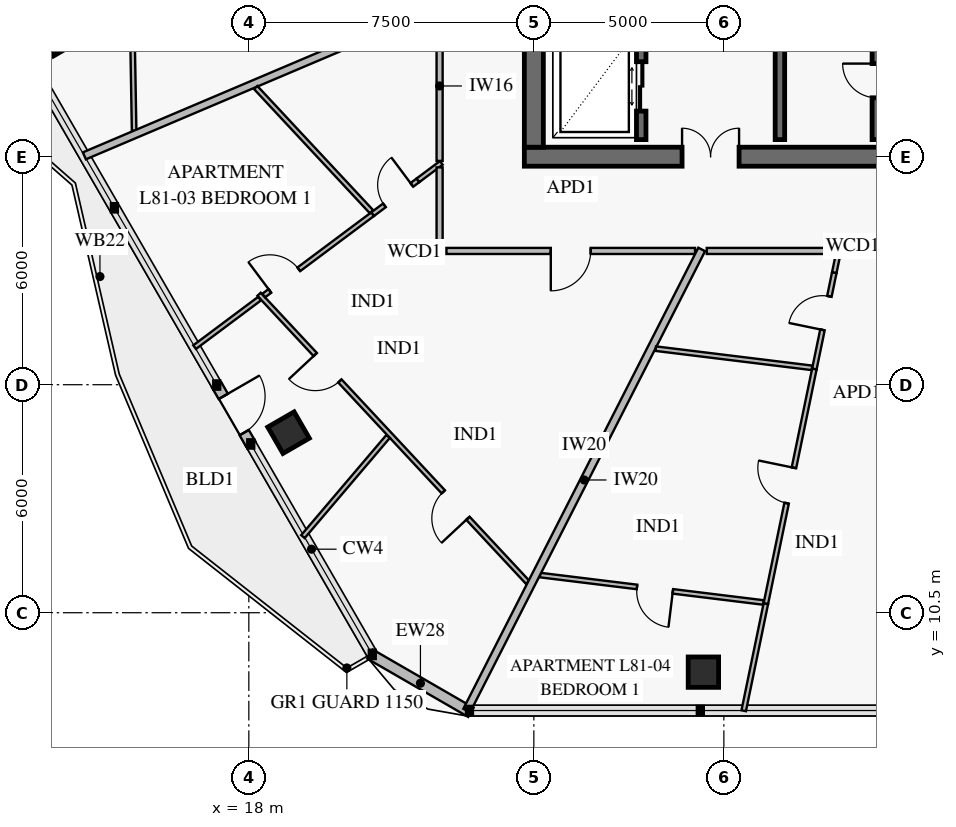
"""IFC4 building model, lengths in metres.
Left out: names, types, materials, properties, quantities, classifications, styles, units other than length and angle.
Written with IfcOpenShell. Run it as: python <this file> out.ifc"""

import sys

from ifc_helpers import new_model, si_unit, direction, frame, frame_2d, origin, origin_2d, place, context, subcontext, project, spatial, rectangle, extrude, element, fill, save


model = new_model("IFC4")
c1 = context("Model", 3, precision=1e-05, world=origin(), true_north=direction((0.0, 1.0)))
c2 = subcontext(c1, "Body", "Model", "MODEL_VIEW")
j1 = project(units=[si_unit("LENGTHUNIT", "METRE"), si_unit("PLANEANGLEUNIT", "RADIAN")], contexts=[c1])
p1 = place(None, origin())
s1 = spatial("IfcSite", under=j1, at=p1, CompositionType="ELEMENT")
p2 = place(p1, origin())
s2 = spatial("IfcBuilding", under=s1, at=p2, CompositionType="ELEMENT")
p3 = place(p2, frame((0.0, 0.0, 319.6)))
s3 = spatial("IfcBuildingStorey", under=s2, at=p3, CompositionType="ELEMENT", Elevation=319.6)
p4 = place(p3, frame((25.25, 22.5, 0.0), z_axis=(0.0, 0.0, 1.0), x_axis=(1.0, 0.0, 0.0)))
e1 = element("IfcWall", 1, at=p4, inside=s3, PredefinedType="SHEAR", context=c2, shape_type="SweptSolid", body=[
    extrude(rectangle(XDim=9.8, YDim=0.5, at=frame_2d((4.9, 0.0))), origin(), (0.0, 0.0, 1.0), 3.8),
])
p5 = place(p4, frame((4.15, 0.0, 0.0)))
e2 = element("IfcOpeningElement", 2, at=p5, cuts=e1, PredefinedType="OPENING", context=c2, shape_type="SweptSolid", body=[
    extrude(rectangle(XDim=1.5, YDim=2.15, at=frame_2d((0.75, 1.075))), frame((0.0, 0.262, 0.0), z_axis=(0.0, -1.0, 0.0), x_axis=(1.0, 0.0, 0.0)), (0.0, 0.0, 1.0), 0.524),
])
p6 = place(p3, frame((25.5, 22.75, 0.0), z_axis=(0.0, 0.0, 1.0), x_axis=(0.0, 1.0, 0.0)))
e3 = element("IfcWall", 3, at=p6, inside=s3, PredefinedType="SHEAR", context=c2, shape_type="SweptSolid", body=[
    extrude(rectangle(XDim=18.5, YDim=0.5, at=frame_2d((9.25, 0.0))), origin(), (0.0, 0.0, 1.0), 3.8),
])
p7 = place(p6, frame((9.0, 0.0, 0.0)))
e4 = element("IfcOpeningElement", 4, at=p7, cuts=e3, PredefinedType="OPENING", context=c2, shape_type="SweptSolid", body=[
    extrude(rectangle(XDim=1.1, YDim=2.15, at=frame_2d((0.55, 1.075))), frame((0.0, 0.262, 0.0), z_axis=(0.0, -1.0, 0.0), x_axis=(1.0, 0.0, 0.0)), (0.0, 0.0, 1.0), 0.524),
])
for number, where, z_axis, x_axis in (
    (5, (13.007, 25.698, 0.0), (0.0, 0.0, 1.0), (0.5, -0.866, 0.0)),
    (6, (19.045, 15.238, 0.0), (0.0, 0.0, 1.0), (0.5, -0.866, 0.0)),
    (7, (29.961, 8.936, 0.0), (0.0, 0.0, 1.0), (1.0, 0.0, 0.0)),
):
    element("IfcColumn", number, at=place(p3, frame(where, z_axis=z_axis, x_axis=x_axis)), inside=s3, PredefinedType="COLUMN", context=c2, shape_type="SweptSolid", body=[
        extrude(rectangle(XDim=0.8, YDim=0.8, at=origin_2d()), origin(), (0.0, 0.0, 1.0), 3.55),
    ])
p8 = place(p3, frame((23.843, 7.878, 0.0), z_axis=(0.0, 0.0, 1.0), x_axis=(-0.866023752521, 0.50000286006, 0.0)))
e8 = element("IfcWall", 8, at=p8, inside=s3, PredefinedType="SOLIDWALL", context=c2, shape_type="SweptSolid", body=[
    extrude(rectangle(XDim=3.065, YDim=0.28, at=frame_2d((1.532, 0.0))), origin(), (0.0, 0.0, 1.0), 3.55),
])
p9 = place(p3, frame((18.051, 14.941, 0.0), z_axis=(0.0, 0.0, 1.0), x_axis=(-0.500041240653, 0.866001592173, 0.0)))
e9 = element("IfcWall", 9, at=p9, inside=s3, PredefinedType="SOLIDWALL", context=c2, shape_type="SweptSolid", body=[
    extrude(rectangle(XDim=1.79, YDim=0.28, at=frame_2d((0.895, 0.0))), origin(), (0.0, 0.0, 1.0), 3.55),
])
p10 = place(p9, frame((0.345, 0.0, 0.0)))
e10 = element("IfcOpeningElement", 10, at=p10, cuts=e9, PredefinedType="OPENING", context=c2, shape_type="SweptSolid", body=[
    extrude(rectangle(XDim=1.1, YDim=2.2, at=frame_2d((0.55, 1.1))), frame((0.0, 0.152, 0.0), z_axis=(0.0, -1.0, 0.0), x_axis=(1.0, 0.0, 0.0)), (0.0, 0.0, 1.0), 0.304),
])
p11 = place(p3, frame((28.325, 22.95, 0.0), z_axis=(0.0, 0.0, 1.0), x_axis=(0.0, 1.0, 0.0)))
e11 = element("IfcWall", 11, at=p11, inside=s3, PredefinedType="SOLIDWALL", context=c2, shape_type="SweptSolid", body=[
    extrude(rectangle(XDim=8.2, YDim=0.25, at=frame_2d((4.1, 0.0))), origin(), (0.0, 0.0, 1.0), 3.8),
])
p12 = place(p11, frame((0.75, 0.0, 0.0)))
e12 = element("IfcOpeningElement", 12, at=p12, cuts=e11, PredefinedType="OPENING", context=c2, shape_type="SweptSolid", body=[
    extrude(rectangle(XDim=1.3, YDim=2.3, at=frame_2d((0.65, 1.15))), frame((0.0, 0.137, 0.0), z_axis=(0.0, -1.0, 0.0), x_axis=(1.0, 0.0, 0.0)), (0.0, 0.0, 1.0), 0.274),
])
p13 = place(p11, frame((3.78, 0.0, 0.0)))
e13 = element("IfcOpeningElement", 13, at=p13, cuts=e11, PredefinedType="OPENING", context=c2, shape_type="SweptSolid", body=[
    extrude(rectangle(XDim=0.9, YDim=2.1, at=frame_2d((0.45, 1.05))), frame((0.0, 0.137, 0.0), z_axis=(0.0, -1.0, 0.0), x_axis=(1.0, 0.0, 0.0)), (0.0, 0.0, 1.0), 0.274),
])
p14 = place(p11, frame((6.5, 0.0, 0.0)))
e14 = element("IfcOpeningElement", 14, at=p14, cuts=e11, PredefinedType="OPENING", context=c2, shape_type="SweptSolid", body=[
    extrude(rectangle(XDim=0.9, YDim=2.1, at=frame_2d((0.45, 1.05))), frame((0.0, 0.137, 0.0), z_axis=(0.0, -1.0, 0.0), x_axis=(1.0, 0.0, 0.0)), (0.0, 0.0, 1.0), 0.274),
])
p15 = place(p3, frame((31.975, 22.95, 0.0), z_axis=(0.0, 0.0, 1.0), x_axis=(0.0, 1.0, 0.0)))
e15 = element("IfcWall", 15, at=p15, inside=s3, PredefinedType="SOLIDWALL", context=c2, shape_type="SweptSolid", body=[
    extrude(rectangle(XDim=8.2, YDim=0.25, at=frame_2d((4.1, 0.0))), origin(), (0.0, 0.0, 1.0), 3.8),
])
p16 = place(p3, frame((34.525, 22.95, 0.0), z_axis=(0.0, 0.0, 1.0), x_axis=(0.0, 1.0, 0.0)))
e16 = element("IfcWall", 16, at=p16, inside=s3, PredefinedType="SOLIDWALL", context=c2, shape_type="SweptSolid", body=[
    extrude(rectangle(XDim=8.2, YDim=0.25, at=frame_2d((4.1, 0.0))), origin(), (0.0, 0.0, 1.0), 3.8),
])
p17 = place(p16, frame((1.1, 0.0, 0.0)))
e17 = element("IfcOpeningElement", 17, at=p17, cuts=e16, PredefinedType="OPENING", context=c2, shape_type="SweptSolid", body=[
    extrude(rectangle(XDim=0.9, YDim=2.1, at=frame_2d((0.45, 1.05))), frame((0.0, 0.137, 0.0), z_axis=(0.0, -1.0, 0.0), x_axis=(1.0, 0.0, 0.0)), (0.0, 0.0, 1.0), 0.274),
])
p18 = place(p16, frame((5.2, 0.0, 0.0)))
e18 = element("IfcOpeningElement", 18, at=p18, cuts=e16, PredefinedType="OPENING", context=c2, shape_type="SweptSolid", body=[
    extrude(rectangle(XDim=0.9, YDim=2.1, at=frame_2d((0.45, 1.05))), frame((0.0, 0.137, 0.0), z_axis=(0.0, -1.0, 0.0), x_axis=(1.0, 0.0, 0.0)), (0.0, 0.0, 1.0), 0.274),
])
p19 = place(p3, frame((14.78, 34.77, 0.0), z_axis=(0.0, 0.0, 1.0), x_axis=(0.017447291159, -0.999847784431, 0.0)))
e19 = element("IfcWall", 19, at=p19, inside=s3, PredefinedType="PARTITIONING", context=c2, shape_type="SweptSolid", body=[
    extrude(rectangle(XDim=11.586, YDim=0.12, at=frame_2d((5.793, 0.0))), origin(), (0.0, 0.0, 1.0), 3.0),
])
p20 = place(p19, frame((2.453, 0.0, 0.0)))
e20 = element("IfcOpeningElement", 20, at=p20, cuts=e19, PredefinedType="OPENING", context=c2, shape_type="SweptSolid", body=[
    extrude(rectangle(XDim=0.95, YDim=2.1, at=frame_2d((0.475, 1.05))), frame((0.0, 0.072, 0.0), z_axis=(0.0, -1.0, 0.0), x_axis=(1.0, 0.0, 0.0)), (0.0, 0.0, 1.0), 0.144),
])
p21 = place(p19, frame((8.005, 0.0, 0.0)))
e21 = element("IfcOpeningElement", 21, at=p21, cuts=e19, PredefinedType="OPENING", context=c2, shape_type="SweptSolid", body=[
    extrude(rectangle(XDim=0.95, YDim=2.1, at=frame_2d((0.475, 1.05))), frame((0.0, 0.072, 0.0), z_axis=(0.0, -1.0, 0.0), x_axis=(1.0, 0.0, 0.0)), (0.0, 0.0, 1.0), 0.144),
])
p22 = place(p3, frame((18.269, 18.88, 0.0), z_axis=(0.0, 0.0, 1.0), x_axis=(0.682011831642, -0.731341138936, 0.0)))
e22 = element("IfcWall", 22, at=p22, inside=s3, PredefinedType="PARTITIONING", context=c2, shape_type="SweptSolid", body=[
    extrude(rectangle(XDim=10.364, YDim=0.12, at=frame_2d((5.182, 0.0))), origin(), (0.0, 0.0, 1.0), 2.97),
])
p23 = place(p22, frame((2.168, 0.0, 0.0)))
e23 = element("IfcOpeningElement", 23, at=p23, cuts=e22, PredefinedType="OPENING", context=c2, shape_type="SweptSolid", body=[
    extrude(rectangle(XDim=0.95, YDim=2.1, at=frame_2d((0.475, 1.05))), frame((0.0, 0.072, 0.0), z_axis=(0.0, -1.0, 0.0), x_axis=(1.0, 0.0, 0.0)), (0.0, 0.0, 1.0), 0.144),
])
p24 = place(p22, frame((7.109, 0.0, 0.0)))
e24 = element("IfcOpeningElement", 24, at=p24, cuts=e22, PredefinedType="OPENING", context=c2, shape_type="SweptSolid", body=[
    extrude(rectangle(XDim=0.95, YDim=2.1, at=frame_2d((0.475, 1.05))), frame((0.0, 0.072, 0.0), z_axis=(0.0, -1.0, 0.0), x_axis=(1.0, 0.0, 0.0)), (0.0, 0.0, 1.0), 0.144),
])
p25 = place(p3, frame((22.45, 21.878, 0.0), z_axis=(0.0, 0.0, 1.0), x_axis=(-0.801099101306, -0.598531728388, 0.0)))
e25 = element("IfcWall", 25, at=p25, inside=s3, PredefinedType="PARTITIONING", context=c2, shape_type="SweptSolid", body=[
    extrude(rectangle(XDim=1.491, YDim=0.12, at=frame_2d((0.746, 0.0))), origin(), (0.0, 0.0, 1.0), 3.2),
])
p26 = place(p25, frame((0.2, 0.0, 0.0)))
e26 = element("IfcOpeningElement", 26, at=p26, cuts=e25, PredefinedType="OPENING", context=c2, shape_type="SweptSolid", body=[
    extrude(rectangle(XDim=0.9, YDim=2.1, at=frame_2d((0.45, 1.05))), frame((0.0, 0.072, 0.0), z_axis=(0.0, -1.0, 0.0), x_axis=(1.0, 0.0, 0.0)), (0.0, 0.0, 1.0), 0.144),
])
p27 = place(p3, frame((21.256, 20.986, 0.0), z_axis=(0.0, 0.0, 1.0), x_axis=(-0.801154440429, -0.598457653122, 0.0)))
e27 = element("IfcWall", 27, at=p27, inside=s3, PredefinedType="PARTITIONING", context=c2, shape_type="SweptSolid", body=[
    extrude(rectangle(XDim=3.574, YDim=0.12, at=frame_2d((1.787, 0.0))), origin(), (0.0, 0.0, 1.0), 3.2),
])
p28 = place(p27, frame((2.422, 0.0, 0.0)))
e28 = element("IfcOpeningElement", 28, at=p28, cuts=e27, PredefinedType="OPENING", context=c2, shape_type="SweptSolid", body=[
    extrude(rectangle(XDim=0.95, YDim=2.1, at=frame_2d((0.475, 1.05))), frame((0.0, 0.072, 0.0), z_axis=(0.0, -1.0, 0.0), x_axis=(1.0, 0.0, 0.0)), (0.0, 0.0, 1.0), 0.144),
])
p29 = place(p3, frame((18.283, 18.765, 0.0), z_axis=(0.0, 0.0, 1.0), x_axis=(-0.80116606549, -0.598442090353, 0.0)))
e29 = element("IfcWall", 29, at=p29, inside=s3, PredefinedType="PARTITIONING", context=c2, shape_type="SweptSolid", body=[
    extrude(rectangle(XDim=2.133, YDim=0.12, at=frame_2d((1.066, 0.0))), origin(), (0.0, 0.0, 1.0), 2.97),
])
p30 = place(p3, frame((23.2, 20.02, 0.0), z_axis=(0.0, 0.0, 1.0), x_axis=(1.0, 0.0, 0.0)))
e30 = element("IfcWall", 30, at=p30, inside=s3, PredefinedType="PARTITIONING", context=c2, shape_type="SweptSolid", body=[
    extrude(rectangle(XDim=6.541, YDim=0.16, at=frame_2d((3.271, 0.0))), origin(), (0.0, 0.0, 1.0), 3.0),
])
p31 = place(p30, frame((2.746, 0.0, 0.0)))
e31 = element("IfcOpeningElement", 31, at=p31, cuts=e30, PredefinedType="OPENING", context=c2, shape_type="SweptSolid", body=[
    extrude(rectangle(XDim=1.05, YDim=2.15, at=frame_2d((0.525, 1.075))), frame((0.0, 0.092, 0.0), z_axis=(0.0, -1.0, 0.0), x_axis=(1.0, 0.0, 0.0)), (0.0, 0.0, 1.0), 0.184),
])
p32 = place(p3, frame((33.406, 19.45, 0.0), z_axis=(0.0, 0.0, 1.0), x_axis=(-0.202468586372, -0.979288757993, 0.0)))
e32 = element("IfcWall", 32, at=p32, inside=s3, PredefinedType="PARTITIONING", context=c2, shape_type="SweptSolid", body=[
    extrude(rectangle(XDim=2.593, YDim=0.12, at=frame_2d((1.296, 0.0))), origin(), (0.0, 0.0, 1.0), 3.55),
])
p33 = place(p32, frame((0.639, 0.0, 0.0)))
e33 = element("IfcOpeningElement", 33, at=p33, cuts=e32, PredefinedType="OPENING", context=c2, shape_type="SweptSolid", body=[
    extrude(rectangle(XDim=0.9, YDim=2.1, at=frame_2d((0.45, 1.05))), frame((0.0, 0.072, 0.0), z_axis=(0.0, -1.0, 0.0), x_axis=(1.0, 0.0, 0.0)), (0.0, 0.0, 1.0), 0.144),
])
p34 = place(p3, frame((32.881, 16.911, 0.0), z_axis=(0.0, 0.0, 1.0), x_axis=(-0.202463483785, -0.979289812943, 0.0)))
e34 = element("IfcWall", 34, at=p34, inside=s3, PredefinedType="PARTITIONING", context=c2, shape_type="SweptSolid", body=[
    extrude(rectangle(XDim=6.305, YDim=0.12, at=frame_2d((3.153, 0.0))), origin(), (0.0, 0.0, 1.0), 3.2),
])
p35 = place(p34, frame((2.653, 0.0, 0.0)))
e35 = element("IfcOpeningElement", 35, at=p35, cuts=e34, PredefinedType="OPENING", context=c2, shape_type="SweptSolid", body=[
    extrude(rectangle(XDim=0.95, YDim=2.1, at=frame_2d((0.475, 1.05))), frame((0.0, 0.072, 0.0), z_axis=(0.0, -1.0, 0.0), x_axis=(1.0, 0.0, 0.0)), (0.0, 0.0, 1.0), 0.144),
])
p36 = place(p3, frame((25.663, 11.491, 0.0), z_axis=(0.0, 0.0, 1.0), x_axis=(0.992544417597, -0.121883465234, 0.0)))
e36 = element("IfcWall", 36, at=p36, inside=s3, PredefinedType="PARTITIONING", context=c2, shape_type="SweptSolid", body=[
    extrude(rectangle(XDim=5.923, YDim=0.12, at=frame_2d((2.961, 0.0))), origin(), (0.0, 0.0, 1.0), 2.97),
])
p37 = place(p36, frame((2.571, 0.0, 0.0)))
e37 = element("IfcOpeningElement", 37, at=p37, cuts=e36, PredefinedType="OPENING", context=c2, shape_type="SweptSolid", body=[
    extrude(rectangle(XDim=0.95, YDim=2.1, at=frame_2d((0.475, 1.05))), frame((0.0, 0.072, 0.0), z_axis=(0.0, -1.0, 0.0), x_axis=(1.0, 0.0, 0.0)), (0.0, 0.0, 1.0), 0.144),
])
p38 = place(p3, frame((23.06, 26.507, 0.0), z_axis=(0.0, 0.0, 1.0), x_axis=(-0.920506642252, -0.390726914314, 0.0)))
e38 = element("IfcWall", 38, at=p38, inside=s3, PredefinedType="PARTITIONING", context=c2, shape_type="SweptSolid", body=[
    extrude(rectangle(XDim=10.197, YDim=0.2, at=frame_2d((5.099, 0.0))), origin(), (0.0, 0.0, 1.0), 2.97),
])
p39 = place(p3, frame((21.665, 15.138, 0.0), z_axis=(0.0, 0.0, 1.0), x_axis=(-0.647711915691, -0.761885341946, 0.0)))
e39 = element("IfcWall", 39, at=p39, inside=s3, PredefinedType="PARTITIONING", context=c2, shape_type="SweptSolid", body=[
    extrude(rectangle(XDim=3.46, YDim=0.12, at=frame_2d((1.73, 0.0))), origin(), (0.0, 0.0, 1.0), 2.97),
])
p40 = place(p3, frame((23.065, 22.337, 0.0), z_axis=(0.0, 0.0, 1.0), x_axis=(-0.801257856401, -0.598319185348, 0.0)))
e40 = element("IfcWall", 40, at=p40, inside=s3, PredefinedType="PARTITIONING", context=c2, shape_type="SweptSolid", body=[
    extrude(rectangle(XDim=0.768, YDim=0.12, at=frame_2d((0.384, 0.0))), origin(), (0.0, 0.0, 1.0), 3.55),
])
p41 = place(p3, frame((18.181, 24.319, 0.0), z_axis=(0.0, 0.0, 1.0), x_axis=(0.682037898073, -0.73131682983, 0.0)))
e41 = element("IfcWall", 41, at=p41, inside=s3, PredefinedType="PARTITIONING", context=c2, shape_type="SweptSolid", body=[
    extrude(rectangle(XDim=4.469, YDim=0.12, at=frame_2d((2.234, 0.0))), origin(), (0.0, 0.0, 1.0), 3.2),
])
p42 = place(p3, frame((29.916, 20.06, 0.0), z_axis=(0.0, 0.0, 1.0), x_axis=(-0.453984595432, -0.891009532559, 0.0)))
e42 = element("IfcWall", 42, at=p42, inside=s3, PredefinedType="PARTITIONING", context=c2, shape_type="SweptSolid", body=[
    extrude(rectangle(XDim=13.618, YDim=0.2, at=frame_2d((6.809, 0.0))), origin(), (0.0, 0.0, 1.0), 2.97),
])
p43 = place(p3, frame((33.533, 20.064, 0.0), z_axis=(0.0, 0.0, 1.0), x_axis=(-0.202695657212, -0.979241783498, 0.0)))
e43 = element("IfcWall", 43, at=p43, inside=s3, PredefinedType="PARTITIONING", context=c2, shape_type="SweptSolid", body=[
    extrude(rectangle(XDim=0.627, YDim=0.12, at=frame_2d((0.314, 0.0))), origin(), (0.0, 0.0, 1.0), 3.55),
])
p44 = place(p3, frame((31.604, 10.736, 0.0), z_axis=(0.0, 0.0, 1.0), x_axis=(-0.202448350059, -0.979292941646, 0.0)))
e44 = element("IfcWall", 44, at=p44, inside=s3, PredefinedType="PARTITIONING", context=c2, shape_type="SweptSolid", body=[
    extrude(rectangle(XDim=2.875, YDim=0.12, at=frame_2d((1.438, 0.0))), origin(), (0.0, 0.0, 1.0), 2.97),
])
p45 = place(p3, frame((28.707, 17.449, 0.0), z_axis=(0.0, 0.0, 1.0), x_axis=(0.992543079952, -0.121894357702, 0.0)))
e45 = element("IfcWall", 45, at=p45, inside=s3, PredefinedType="PARTITIONING", context=c2, shape_type="SweptSolid", body=[
    extrude(rectangle(XDim=4.142, YDim=0.12, at=frame_2d((2.071, 0.0))), origin(), (0.0, 0.0, 1.0), 3.0),
])
p46 = place(p3, frame((23.02, 22.219, 0.0), z_axis=(0.0, 0.0, 1.0), x_axis=(0.0, -1.0, 0.0)))
e46 = element("IfcWall", 46, at=p46, inside=s3, PredefinedType="PARTITIONING", context=c2, shape_type="SweptSolid", body=[
    extrude(rectangle(XDim=2.019, YDim=0.16, at=frame_2d((1.01, 0.0))), origin(), (0.0, 0.0, 1.0), 3.55),
])
p47 = place(p3, frame((23.02, 26.334, 0.0), z_axis=(0.0, 0.0, 1.0), x_axis=(0.0, -1.0, 0.0)))
e47 = element("IfcWall", 47, at=p47, inside=s3, PredefinedType="PARTITIONING", context=c2, shape_type="SweptSolid", body=[
    extrude(rectangle(XDim=3.945, YDim=0.16, at=frame_2d((1.973, 0.0))), origin(), (0.0, 0.0, 1.0), 3.55),
])
p48 = place(p3, frame((33.593, 20.02, 0.0), z_axis=(0.0, 0.0, 1.0), x_axis=(1.0, 0.0, 0.0)))
e48 = element("IfcWall", 48, at=p48, inside=s3, PredefinedType="PARTITIONING", context=c2, shape_type="SweptSolid", body=[
    extrude(rectangle(XDim=1.039, YDim=0.16, at=frame_2d((0.52, 0.0))), origin(), (0.0, 0.0, 1.0), 3.55),
])
p49 = place(p3, frame((30.049, 20.02, 0.0), z_axis=(0.0, 0.0, 1.0), x_axis=(1.0, 0.0, 0.0)))
e49 = element("IfcWall", 49, at=p49, inside=s3, PredefinedType="PARTITIONING", context=c2, shape_type="SweptSolid", body=[
    extrude(rectangle(XDim=3.405, YDim=0.16, at=frame_2d((1.702, 0.0))), origin(), (0.0, 0.0, 1.0), 3.0),
])
p50 = place(p10, frame((1.1, 0.0, 0.0), z_axis=(0.0, 0.0, 1.0), x_axis=(-1.0, 0.0, 0.0)))
e50 = element("IfcDoor", 50, at=p50, inside=s3, OperationType="SINGLE_SWING_LEFT", PredefinedType="DOOR", context=c2, shape_type="SweptSolid", body=[
    extrude(rectangle(XDim=1.1, YDim=2.2, at=frame_2d((0.55, 1.1))), frame((0.0, 0.025, 0.0), z_axis=(0.0, -1.0, 0.0), x_axis=(1.0, 0.0, 0.0)), (0.0, 0.0, 1.0), 0.05),
])
fill(e10, e50)
p51 = place(p5, origin())
e51 = element("IfcDoor", 51, at=p51, inside=s3, OperationType="DOUBLE_DOOR_SINGLE_SWING", PredefinedType="DOOR", context=c2, shape_type="SweptSolid", body=[
    extrude(rectangle(XDim=1.5, YDim=2.15, at=frame_2d((0.75, 1.075))), frame((0.0, 0.025, 0.0), z_axis=(0.0, -1.0, 0.0), x_axis=(1.0, 0.0, 0.0)), (0.0, 0.0, 1.0), 0.05),
])
fill(e2, e51)
p52 = place(p12, frame((1.3, 0.0, 0.0), z_axis=(0.0, 0.0, 1.0), x_axis=(-1.0, 0.0, 0.0)))
e52 = element("IfcDoor", 52, at=p52, inside=s3, OperationType="DOUBLE_DOOR_SLIDING", PredefinedType="DOOR", context=c2, shape_type="SweptSolid", body=[
    extrude(rectangle(XDim=1.3, YDim=2.3, at=frame_2d((0.65, 1.15))), frame((0.0, 0.025, 0.0), z_axis=(0.0, -1.0, 0.0), x_axis=(1.0, 0.0, 0.0)), (0.0, 0.0, 1.0), 0.05),
])
fill(e12, e52)
p53 = place(p17, origin())
e53 = element("IfcDoor", 53, at=p53, inside=s3, OperationType="SINGLE_SWING_RIGHT", PredefinedType="DOOR", context=c2, shape_type="SweptSolid", body=[
    extrude(rectangle(XDim=0.9, YDim=2.1, at=frame_2d((0.45, 1.05))), frame((0.0, 0.025, 0.0), z_axis=(0.0, -1.0, 0.0), x_axis=(1.0, 0.0, 0.0)), (0.0, 0.0, 1.0), 0.05),
])
fill(e17, e53)
p54 = place(p23, frame((0.95, 0.0, 0.0), z_axis=(0.0, 0.0, 1.0), x_axis=(-1.0, 0.0, 0.0)))
e54 = element("IfcDoor", 54, at=p54, inside=s3, OperationType="SINGLE_SWING_RIGHT", PredefinedType="DOOR", context=c2, shape_type="SweptSolid", body=[
    extrude(rectangle(XDim=0.95, YDim=2.1, at=frame_2d((0.475, 1.05))), frame((0.0, 0.025, 0.0), z_axis=(0.0, -1.0, 0.0), x_axis=(1.0, 0.0, 0.0)), (0.0, 0.0, 1.0), 0.05),
])
fill(e23, e54)
p55 = place(p24, frame((0.95, 0.0, 0.0), z_axis=(0.0, 0.0, 1.0), x_axis=(-1.0, 0.0, 0.0)))
e55 = element("IfcDoor", 55, at=p55, inside=s3, OperationType="SINGLE_SWING_LEFT", PredefinedType="DOOR", context=c2, shape_type="SweptSolid", body=[
    extrude(rectangle(XDim=0.95, YDim=2.1, at=frame_2d((0.475, 1.05))), frame((0.0, 0.025, 0.0), z_axis=(0.0, -1.0, 0.0), x_axis=(1.0, 0.0, 0.0)), (0.0, 0.0, 1.0), 0.05),
])
fill(e24, e55)
p56 = place(p26, frame((0.9, 0.0, 0.0), z_axis=(0.0, 0.0, 1.0), x_axis=(-1.0, 0.0, 0.0)))
e56 = element("IfcDoor", 56, at=p56, inside=s3, OperationType="SINGLE_SWING_RIGHT", PredefinedType="DOOR", context=c2, shape_type="SweptSolid", body=[
    extrude(rectangle(XDim=0.9, YDim=2.1, at=frame_2d((0.45, 1.05))), frame((0.0, 0.025, 0.0), z_axis=(0.0, -1.0, 0.0), x_axis=(1.0, 0.0, 0.0)), (0.0, 0.0, 1.0), 0.05),
])
fill(e26, e56)
p57 = place(p28, frame((0.95, 0.0, 0.0), z_axis=(0.0, 0.0, 1.0), x_axis=(-1.0, 0.0, 0.0)))
e57 = element("IfcDoor", 57, at=p57, inside=s3, OperationType="SINGLE_SWING_LEFT", PredefinedType="DOOR", context=c2, shape_type="SweptSolid", body=[
    extrude(rectangle(XDim=0.95, YDim=2.1, at=frame_2d((0.475, 1.05))), frame((0.0, 0.025, 0.0), z_axis=(0.0, -1.0, 0.0), x_axis=(1.0, 0.0, 0.0)), (0.0, 0.0, 1.0), 0.05),
])
fill(e28, e57)
p58 = place(p31, frame((1.05, 0.0, 0.0), z_axis=(0.0, 0.0, 1.0), x_axis=(-1.0, 0.0, 0.0)))
e58 = element("IfcDoor", 58, at=p58, inside=s3, OperationType="SINGLE_SWING_RIGHT", PredefinedType="DOOR", context=c2, shape_type="SweptSolid", body=[
    extrude(rectangle(XDim=1.05, YDim=2.15, at=frame_2d((0.525, 1.075))), frame((0.0, 0.025, 0.0), z_axis=(0.0, -1.0, 0.0), x_axis=(1.0, 0.0, 0.0)), (0.0, 0.0, 1.0), 0.05),
])
fill(e31, e58)
p59 = place(p33, frame((0.9, 0.0, 0.0), z_axis=(0.0, 0.0, 1.0), x_axis=(-1.0, 0.0, 0.0)))
e59 = element("IfcDoor", 59, at=p59, inside=s3, OperationType="SINGLE_SWING_LEFT", PredefinedType="DOOR", context=c2, shape_type="SweptSolid", body=[
    extrude(rectangle(XDim=0.9, YDim=2.1, at=frame_2d((0.45, 1.05))), frame((0.0, 0.025, 0.0), z_axis=(0.0, -1.0, 0.0), x_axis=(1.0, 0.0, 0.0)), (0.0, 0.0, 1.0), 0.05),
])
fill(e33, e59)
p60 = place(p35, frame((0.95, 0.0, 0.0), z_axis=(0.0, 0.0, 1.0), x_axis=(-1.0, 0.0, 0.0)))
e60 = element("IfcDoor", 60, at=p60, inside=s3, OperationType="SINGLE_SWING_RIGHT", PredefinedType="DOOR", context=c2, shape_type="SweptSolid", body=[
    extrude(rectangle(XDim=0.95, YDim=2.1, at=frame_2d((0.475, 1.05))), frame((0.0, 0.025, 0.0), z_axis=(0.0, -1.0, 0.0), x_axis=(1.0, 0.0, 0.0)), (0.0, 0.0, 1.0), 0.05),
])
fill(e35, e60)
p61 = place(p37, frame((0.95, 0.0, 0.0), z_axis=(0.0, 0.0, 1.0), x_axis=(-1.0, 0.0, 0.0)))
e61 = element("IfcDoor", 61, at=p61, inside=s3, OperationType="SINGLE_SWING_LEFT", PredefinedType="DOOR", context=c2, shape_type="SweptSolid", body=[
    extrude(rectangle(XDim=0.95, YDim=2.1, at=frame_2d((0.475, 1.05))), frame((0.0, 0.025, 0.0), z_axis=(0.0, -1.0, 0.0), x_axis=(1.0, 0.0, 0.0)), (0.0, 0.0, 1.0), 0.05),
])
fill(e37, e61)
save(model, sys.argv[1])
